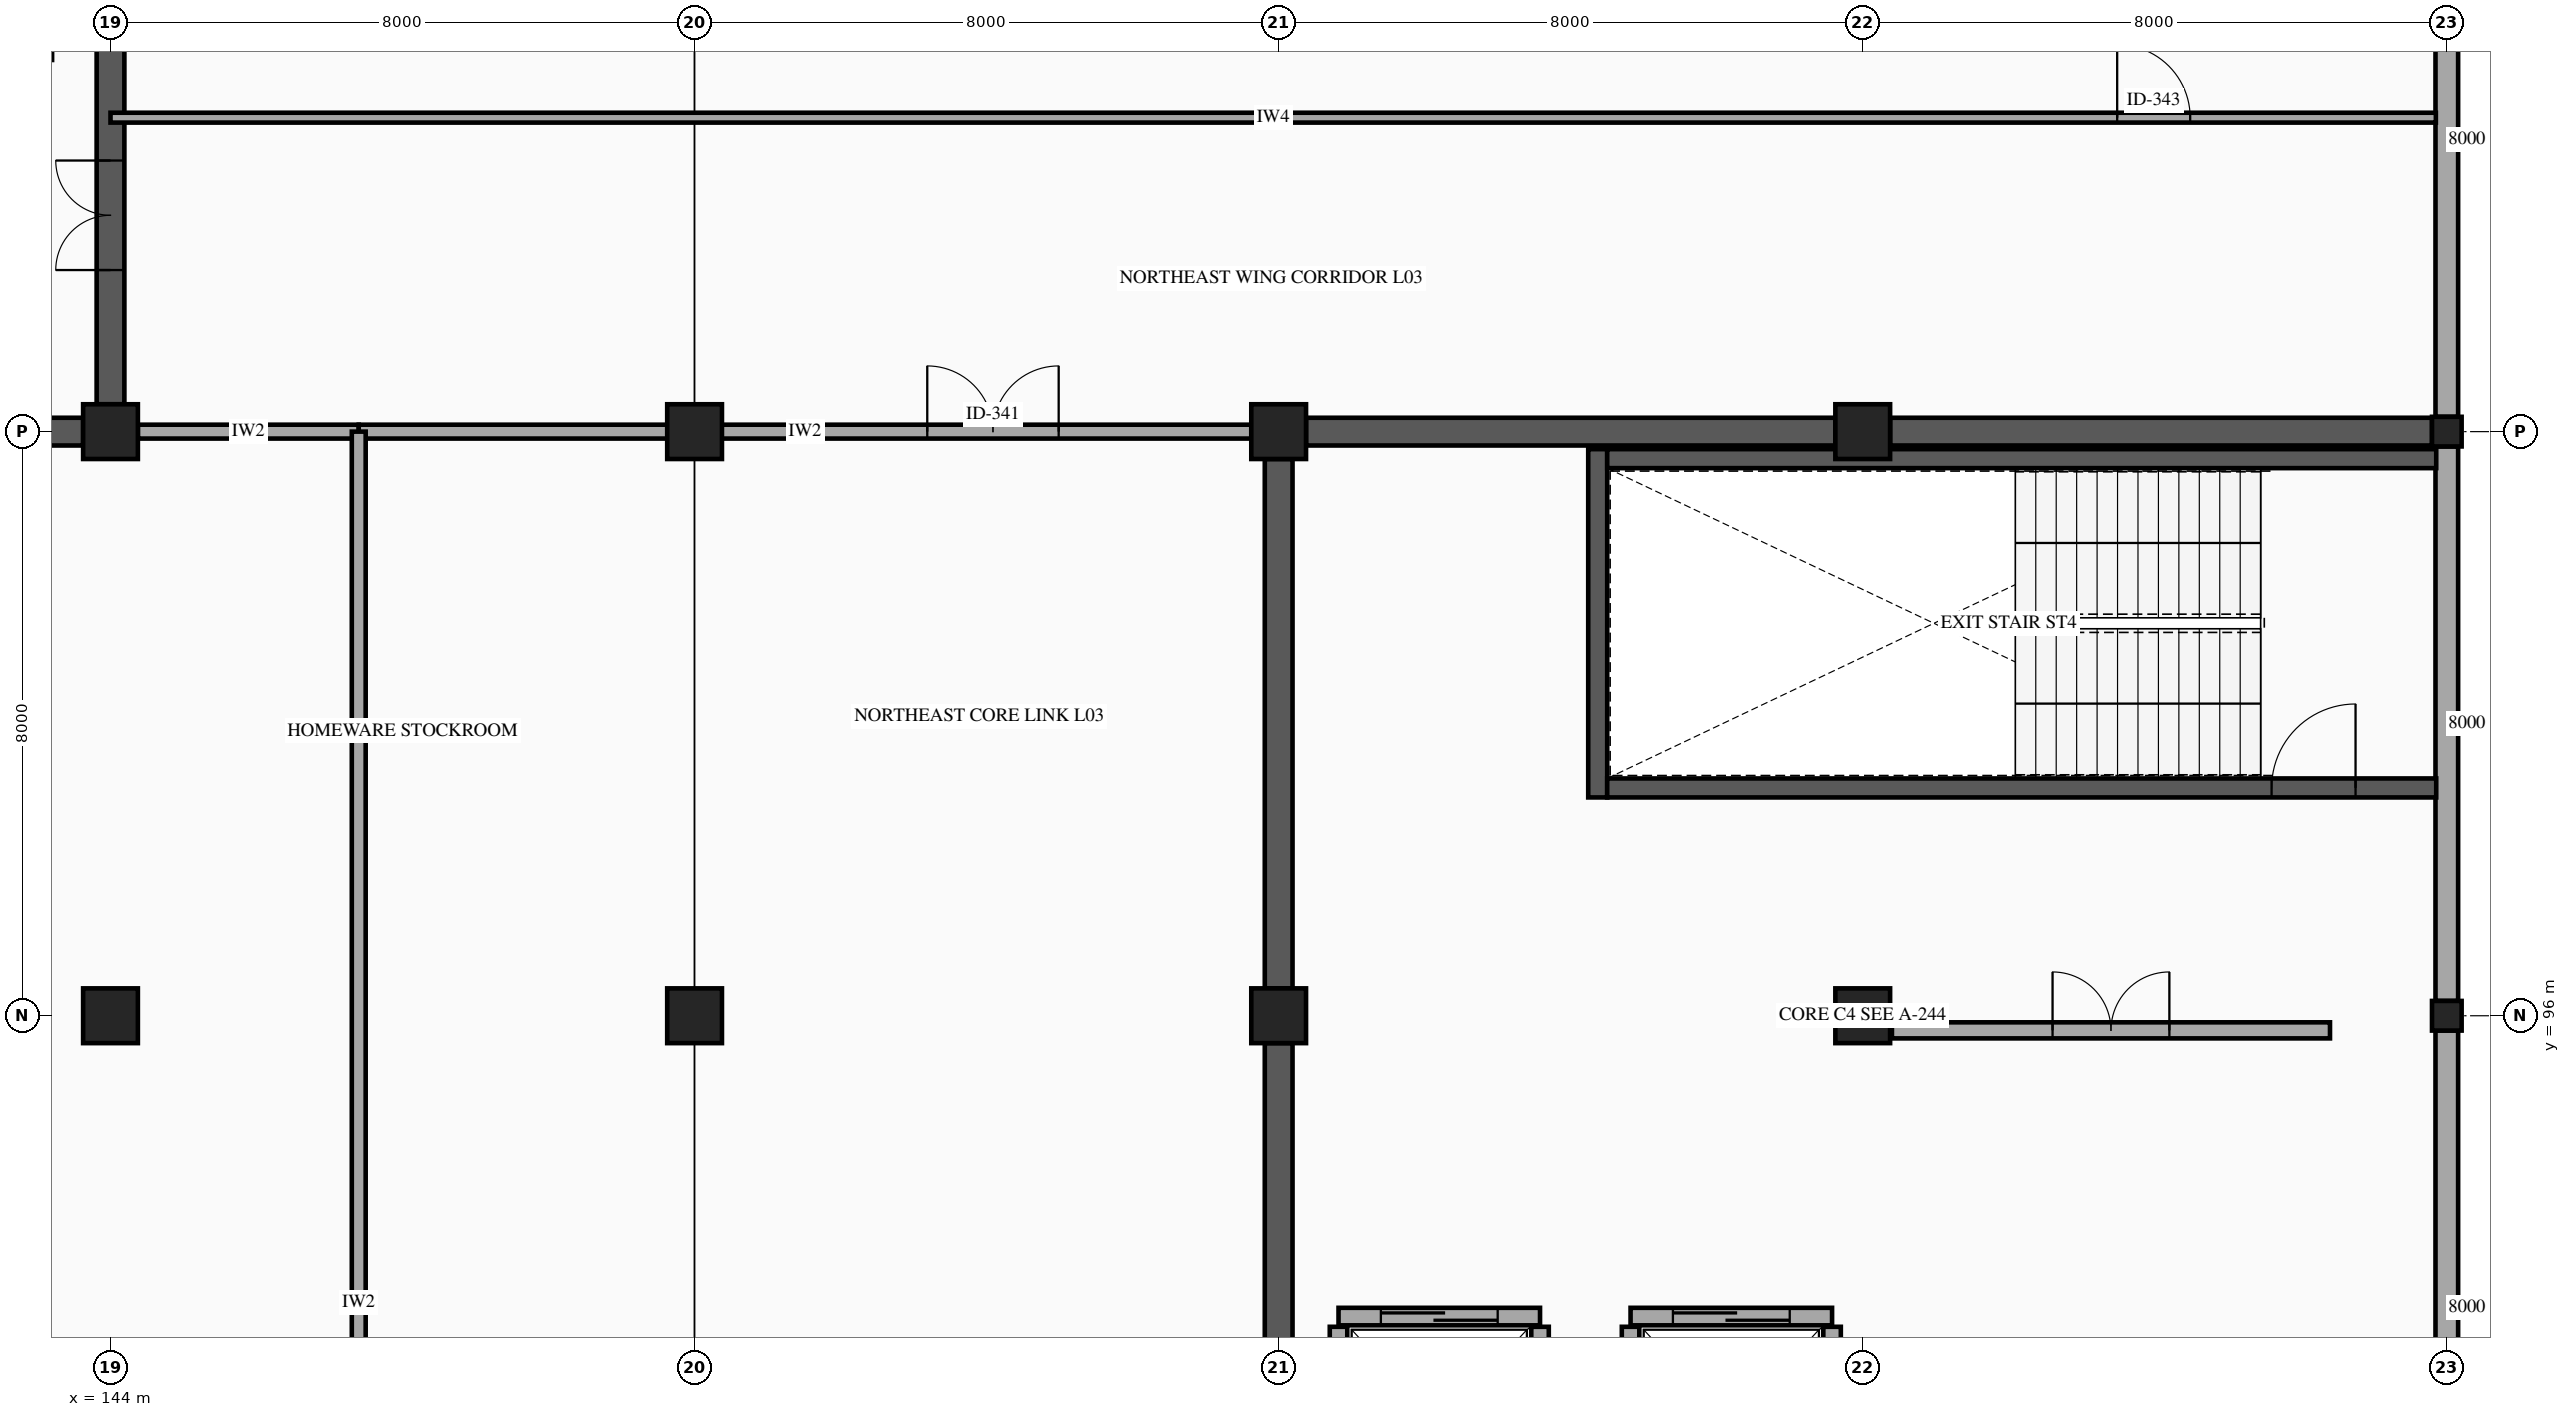
"""IFC4 building model, lengths in metres.
Left out: names, types, materials, properties, quantities, classifications, styles, units other than length and angle.
Written with IfcOpenShell. Run it as: python <this file> out.ifc"""

import sys

from ifc_helpers import new_model, si_unit, direction, frame, frame_2d, origin, origin_2d, place, context, subcontext, project, spatial, rectangle, hollow_rectangle, extrude, element, fill, save


model = new_model("IFC4")
c1 = context("Model", 3, precision=1e-05, world=origin(), true_north=direction((0.0, 1.0)))
c2 = subcontext(c1, "Body", "Model", "MODEL_VIEW")
j1 = project(units=[si_unit("LENGTHUNIT", "METRE"), si_unit("PLANEANGLEUNIT", "RADIAN")], contexts=[c1])
p1 = place(None, origin())
s1 = spatial("IfcSite", under=j1, at=p1, CompositionType="ELEMENT")
p2 = place(p1, origin())
s2 = spatial("IfcBuilding", under=s1, at=p2, CompositionType="ELEMENT")
p3 = place(p2, frame((0.0, 0.0, 14.9)))
s3 = spatial("IfcBuildingStorey", under=s2, at=p3, CompositionType="ELEMENT", Elevation=14.9)
for number, where, z_axis, x_axis in (
    (1, (144.0, 96.0, 0.0), (0.0, 0.0, 1.0), (1.0, 0.0, 0.0)),
    (2, (144.0, 104.0, 0.0), (0.0, 0.0, 1.0), (1.0, 0.0, 0.0)),
    (3, (152.0, 96.0, 0.0), (0.0, 0.0, 1.0), (1.0, 0.0, 0.0)),
    (4, (152.0, 104.0, 0.0), (0.0, 0.0, 1.0), (1.0, 0.0, 0.0)),
    (5, (160.0, 96.0, 0.0), (0.0, 0.0, 1.0), (1.0, 0.0, 0.0)),
    (6, (160.0, 104.0, 0.0), (0.0, 0.0, 1.0), (1.0, 0.0, 0.0)),
    (7, (168.0, 96.0, 0.0), (0.0, 0.0, 1.0), (1.0, 0.0, 0.0)),
    (8, (168.0, 104.0, 0.0), (0.0, 0.0, 1.0), (1.0, 0.0, 0.0)),
):
    element("IfcColumn", number, at=place(p3, frame(where, z_axis=z_axis, x_axis=x_axis)), inside=s3, PredefinedType="COLUMN", context=c2, shape_type="SweptSolid", body=[
        extrude(rectangle(XDim=0.75, YDim=0.75, at=origin_2d()), origin(), (0.0, 0.0, 1.0), 4.5),
    ])
for number, where, z_axis, x_axis in (
    (9, (176.0, 96.0, 0.0), (0.0, 0.0, 1.0), (1.0, 0.0, 0.0)),
    (10, (176.0, 104.0, 0.0), (0.0, 0.0, 1.0), (1.0, 0.0, 0.0)),
):
    element("IfcColumn", number, at=place(p3, frame(where, z_axis=z_axis, x_axis=x_axis)), inside=s3, PredefinedType="COLUMN", context=c2, shape_type="SweptSolid", body=[
        extrude(hollow_rectangle(XDim=0.406, YDim=0.406, WallThickness=0.015, InnerFilletRadius=0.015, OuterFilletRadius=0.029, at=origin_2d()), origin(), (0.0, 0.0, 1.0), 4.5),
    ])
for number, where, z_axis, x_axis in (
    (11, (176.0, 111.797, 0.0), (0.0, 0.0, 1.0), (0.0, -1.0, 0.0)),
    (12, (176.0, 103.797, 0.0), (0.0, 0.0, 1.0), (0.0, -1.0, 0.0)),
    (13, (176.0, 95.797, 0.0), (0.0, 0.0, 1.0), (0.0, -1.0, 0.0)),
):
    element("IfcWall", number, at=place(p3, frame(where, z_axis=z_axis, x_axis=x_axis)), inside=s3, PredefinedType="STANDARD", context=c2, shape_type="SweptSolid", body=[
        extrude(rectangle(XDim=7.594, YDim=0.31, at=frame_2d((3.797, 0.0))), origin(), (0.0, 0.0, 1.0), 3.48),
    ])
p4 = place(p3, frame((136.375, 104.0, 0.0), z_axis=(0.0, 0.0, 1.0), x_axis=(1.0, 0.0, 0.0)))
e14 = element("IfcWall", 14, at=p4, inside=s3, PredefinedType="SHEAR", context=c2, shape_type="SweptSolid", body=[
    extrude(rectangle(XDim=7.25, YDim=0.38, at=frame_2d((3.625, 0.0))), origin(), (0.0, 0.0, 1.0), 4.28),
])
p5 = place(p4, frame((2.875, 0.0, 0.0)))
e15 = element("IfcOpeningElement", 15, at=p5, cuts=e14, PredefinedType="OPENING", context=c2, shape_type="SweptSolid", body=[
    extrude(rectangle(XDim=1.5, YDim=2.15, at=frame_2d((0.75, 1.075))), frame((0.0, 0.2, 0.0), z_axis=(0.0, -1.0, 0.0), x_axis=(1.0, 0.0, 0.0)), (0.0, 0.0, 1.0), 0.4),
])
p6 = place(p3, frame((144.0, 104.375, 0.0), z_axis=(0.0, 0.0, 1.0), x_axis=(0.0, 1.0, 0.0)))
e16 = element("IfcWall", 16, at=p6, inside=s3, PredefinedType="SHEAR", context=c2, shape_type="SweptSolid", body=[
    extrude(rectangle(XDim=7.25, YDim=0.38, at=frame_2d((3.625, 0.0))), origin(), (0.0, 0.0, 1.0), 4.28),
])
p7 = place(p6, frame((1.838, 0.0, 0.0)))
e17 = element("IfcOpeningElement", 17, at=p7, cuts=e16, PredefinedType="OPENING", context=c2, shape_type="SweptSolid", body=[
    extrude(rectangle(XDim=1.5, YDim=2.15, at=frame_2d((0.75, 1.075))), frame((0.0, 0.2, 0.0), z_axis=(0.0, -1.0, 0.0), x_axis=(1.0, 0.0, 0.0)), (0.0, 0.0, 1.0), 0.4),
])
p8 = place(p3, frame((164.37, 98.99, 0.0), z_axis=(0.0, 0.0, 1.0), x_axis=(0.0, 1.0, 0.0)))
e18 = element("IfcWall", 18, at=p8, inside=s3, PredefinedType="SHEAR", context=c2, shape_type="SweptSolid", body=[
    extrude(rectangle(XDim=4.77, YDim=0.26, at=frame_2d((2.385, 0.0))), origin(), (0.0, 0.0, 1.0), 4.28),
])
p9 = place(p3, frame((164.5, 99.12, 0.0), z_axis=(0.0, 0.0, 1.0), x_axis=(1.0, 0.0, 0.0)))
e19 = element("IfcWall", 19, at=p9, inside=s3, PredefinedType="SHEAR", context=c2, shape_type="SweptSolid", body=[
    extrude(rectangle(XDim=11.355, YDim=0.26, at=frame_2d((5.677, 0.0))), origin(), (0.0, 0.0, 1.0), 4.28),
])
p10 = place(p9, frame((9.1, 0.0, 0.0)))
e20 = element("IfcOpeningElement", 20, at=p10, cuts=e19, PredefinedType="OPENING", context=c2, shape_type="SweptSolid", body=[
    extrude(rectangle(XDim=1.15, YDim=2.15, at=frame_2d((0.575, 1.075))), frame((0.0, 0.14, 0.0), z_axis=(0.0, -1.0, 0.0), x_axis=(1.0, 0.0, 0.0)), (0.0, 0.0, 1.0), 0.28),
])
p11 = place(p3, frame((164.5, 103.63, 0.0), z_axis=(0.0, 0.0, 1.0), x_axis=(1.0, 0.0, 0.0)))
e21 = element("IfcWall", 21, at=p11, inside=s3, PredefinedType="SHEAR", context=c2, shape_type="SweptSolid", body=[
    extrude(rectangle(XDim=11.355, YDim=0.26, at=frame_2d((5.677, 0.0))), origin(), (0.0, 0.0, 1.0), 4.28),
])
p12 = place(p3, frame((160.375, 104.0, 0.0), z_axis=(0.0, 0.0, 1.0), x_axis=(1.0, 0.0, 0.0)))
e22 = element("IfcWall", 22, at=p12, inside=s3, PredefinedType="SHEAR", context=c2, shape_type="SweptSolid", body=[
    extrude(rectangle(XDim=7.25, YDim=0.38, at=frame_2d((3.625, 0.0))), origin(), (0.0, 0.0, 1.0), 4.28),
])
p13 = place(p3, frame((168.375, 104.0, 0.0), z_axis=(0.0, 0.0, 1.0), x_axis=(1.0, 0.0, 0.0)))
e23 = element("IfcWall", 23, at=p13, inside=s3, PredefinedType="SHEAR", context=c2, shape_type="SweptSolid", body=[
    extrude(rectangle(XDim=7.422, YDim=0.38, at=frame_2d((3.711, 0.0))), origin(), (0.0, 0.0, 1.0), 4.28),
])
for number, where, z_axis, x_axis in (
    (24, (160.0, 88.375, 0.0), (0.0, 0.0, 1.0), (0.0, 1.0, 0.0)),
    (25, (160.0, 96.375, 0.0), (0.0, 0.0, 1.0), (0.0, 1.0, 0.0)),
):
    element("IfcWall", number, at=place(p3, frame(where, z_axis=z_axis, x_axis=x_axis)), inside=s3, PredefinedType="SHEAR", context=c2, shape_type="SweptSolid", body=[
        extrude(rectangle(XDim=7.25, YDim=0.38, at=frame_2d((3.625, 0.0))), origin(), (0.0, 0.0, 1.0), 4.28),
    ])
p14 = place(p3, frame((164.82, 91.88, 0.0), z_axis=(0.0, 0.0, 1.0), x_axis=(1.0, 0.0, 0.0)))
e26 = element("IfcWall", 26, at=p14, inside=s3, PredefinedType="PARTITIONING", context=c2, shape_type="SweptSolid", body=[
    extrude(rectangle(XDim=2.76, YDim=0.24, at=frame_2d((1.38, 0.0))), origin(), (0.0, 0.0, 1.0), 4.28),
])
p15 = place(p14, frame((0.58, 0.0, 0.0)))
e27 = element("IfcOpeningElement", 27, at=p15, cuts=e26, PredefinedType="OPENING", context=c2, shape_type="SweptSolid", body=[
    extrude(rectangle(XDim=1.6, YDim=2.3, at=frame_2d((0.8, 1.15))), frame((0.0, 0.13, 0.0), z_axis=(0.0, -1.0, 0.0), x_axis=(1.0, 0.0, 0.0)), (0.0, 0.0, 1.0), 0.26),
])
for number, where, z_axis, x_axis in (
    (28, (164.82, 89.06, 0.0), (0.0, 0.0, 1.0), (0.0, 1.0, 0.0)),
    (29, (167.58, 89.06, 0.0), (0.0, 0.0, 1.0), (0.0, 1.0, 0.0)),
):
    element("IfcWall", number, at=place(p3, frame(where, z_axis=z_axis, x_axis=x_axis)), inside=s3, PredefinedType="PARTITIONING", context=c2, shape_type="SweptSolid", body=[
        extrude(rectangle(XDim=2.68, YDim=0.24, at=frame_2d((1.34, 0.0))), origin(), (0.0, 0.0, 1.0), 4.28),
    ])
p16 = place(p3, frame((160.82, 91.88, 0.0), z_axis=(0.0, 0.0, 1.0), x_axis=(1.0, 0.0, 0.0)))
e30 = element("IfcWall", 30, at=p16, inside=s3, PredefinedType="PARTITIONING", context=c2, shape_type="SweptSolid", body=[
    extrude(rectangle(XDim=2.76, YDim=0.24, at=frame_2d((1.38, 0.0))), origin(), (0.0, 0.0, 1.0), 4.28),
])
p17 = place(p16, frame((0.58, 0.0, 0.0)))
e31 = element("IfcOpeningElement", 31, at=p17, cuts=e30, PredefinedType="OPENING", context=c2, shape_type="SweptSolid", body=[
    extrude(rectangle(XDim=1.6, YDim=2.3, at=frame_2d((0.8, 1.15))), frame((0.0, 0.13, 0.0), z_axis=(0.0, -1.0, 0.0), x_axis=(1.0, 0.0, 0.0)), (0.0, 0.0, 1.0), 0.26),
])
for number, where, z_axis, x_axis in (
    (32, (160.82, 89.06, 0.0), (0.0, 0.0, 1.0), (0.0, 1.0, 0.0)),
    (33, (163.58, 89.06, 0.0), (0.0, 0.0, 1.0), (0.0, 1.0, 0.0)),
):
    element("IfcWall", number, at=place(p3, frame(where, z_axis=z_axis, x_axis=x_axis)), inside=s3, PredefinedType="PARTITIONING", context=c2, shape_type="SweptSolid", body=[
        extrude(rectangle(XDim=2.68, YDim=0.24, at=frame_2d((1.34, 0.0))), origin(), (0.0, 0.0, 1.0), 4.28),
    ])
p18 = place(p3, frame((168.4, 95.8, 0.0), z_axis=(0.0, 0.0, 1.0), x_axis=(1.0, 0.0, 0.0)))
e34 = element("IfcWall", 34, at=p18, inside=s3, PredefinedType="PARTITIONING", context=c2, shape_type="SweptSolid", body=[
    extrude(rectangle(XDim=6.0, YDim=0.22, at=frame_2d((3.0, 0.0))), origin(), (0.0, 0.0, 1.0), 3.48),
])
p19 = place(p18, frame((2.2, 0.0, 0.0)))
e35 = element("IfcOpeningElement", 35, at=p19, cuts=e34, PredefinedType="OPENING", context=c2, shape_type="SweptSolid", body=[
    extrude(rectangle(XDim=1.6, YDim=2.15, at=frame_2d((0.8, 1.075))), frame((0.0, 0.12, 0.0), z_axis=(0.0, -1.0, 0.0), x_axis=(1.0, 0.0, 0.0)), (0.0, 0.0, 1.0), 0.24),
])
p20 = place(p3, frame((144.375, 104.0, 0.0), z_axis=(0.0, 0.0, 1.0), x_axis=(1.0, 0.0, 0.0)))
e36 = element("IfcWall", 36, at=p20, inside=s3, PredefinedType="PARTITIONING", context=c2, shape_type="SweptSolid", body=[
    extrude(rectangle(XDim=3.025, YDim=0.19, at=frame_2d((1.512, 0.0))), origin(), (0.0, 0.0, 1.0), 3.48),
])
p21 = place(p3, frame((147.4, 104.0, 0.0), z_axis=(0.0, 0.0, 1.0), x_axis=(1.0, 0.0, 0.0)))
e37 = element("IfcWall", 37, at=p21, inside=s3, PredefinedType="PARTITIONING", context=c2, shape_type="SweptSolid", body=[
    extrude(rectangle(XDim=12.225, YDim=0.19, at=frame_2d((6.113, 0.0))), origin(), (0.0, 0.0, 1.0), 3.48),
])
p22 = place(p21, frame((7.787, 0.0, 0.0)))
e38 = element("IfcOpeningElement", 38, at=p22, cuts=e37, PredefinedType="OPENING", context=c2, shape_type="SweptSolid", body=[
    extrude(rectangle(XDim=1.8, YDim=2.25, at=frame_2d((0.9, 1.125))), frame((0.0, 0.105, 0.0), z_axis=(0.0, -1.0, 0.0), x_axis=(1.0, 0.0, 0.0)), (0.0, 0.0, 1.0), 0.21),
])
p23 = place(p3, frame((147.4, 80.15, 0.0), z_axis=(0.0, 0.0, 1.0), x_axis=(0.0, 1.0, 0.0)))
e39 = element("IfcWall", 39, at=p23, inside=s3, PredefinedType="PARTITIONING", context=c2, shape_type="SweptSolid", body=[
    extrude(rectangle(XDim=23.85, YDim=0.19, at=frame_2d((11.925, 0.0))), origin(), (0.0, 0.0, 1.0), 3.48),
])
p24 = place(p23, frame((2.862, 0.0, 0.0)))
e40 = element("IfcOpeningElement", 40, at=p24, cuts=e39, PredefinedType="OPENING", context=c2, shape_type="SweptSolid", body=[
    extrude(rectangle(XDim=1.8, YDim=2.25, at=frame_2d((0.9, 1.125))), frame((0.0, 0.105, 0.0), z_axis=(0.0, -1.0, 0.0), x_axis=(1.0, 0.0, 0.0)), (0.0, 0.0, 1.0), 0.21),
])
p25 = place(p3, frame((144.0, 108.3, 0.0), z_axis=(0.0, 0.0, 1.0), x_axis=(1.0, 0.0, 0.0)))
e41 = element("IfcWall", 41, at=p25, inside=s3, PredefinedType="PARTITIONING", context=c2, shape_type="SweptSolid", body=[
    extrude(rectangle(XDim=31.85, YDim=0.135, at=frame_2d((15.925, 0.0))), origin(), (0.0, 0.0, 1.0), 3.48),
])
p26 = place(p25, frame((27.485, 0.0, 0.0)))
e42 = element("IfcOpeningElement", 42, at=p26, cuts=e41, PredefinedType="OPENING", context=c2, shape_type="SweptSolid", body=[
    extrude(rectangle(XDim=1.0, YDim=2.15, at=frame_2d((0.5, 1.075))), frame((0.0, 0.077, 0.0), z_axis=(0.0, -1.0, 0.0), x_axis=(1.0, 0.0, 0.0)), (0.0, 0.0, 1.0), 0.155),
])
p27 = place(p7, origin())
e43 = element("IfcDoor", 43, at=p27, inside=s3, OperationType="DOUBLE_DOOR_SINGLE_SWING", PredefinedType="DOOR", context=c2, shape_type="SweptSolid", body=[
    extrude(rectangle(XDim=1.5, YDim=2.15, at=frame_2d((0.75, 1.075))), frame((0.0, 0.025, 0.0), z_axis=(0.0, -1.0, 0.0), x_axis=(1.0, 0.0, 0.0)), (0.0, 0.0, 1.0), 0.05),
])
fill(e17, e43)
p28 = place(p10, origin())
e44 = element("IfcDoor", 44, at=p28, inside=s3, OperationType="SINGLE_SWING_RIGHT", PredefinedType="DOOR", context=c2, shape_type="SweptSolid", body=[
    extrude(rectangle(XDim=1.15, YDim=2.15, at=frame_2d((0.575, 1.075))), frame((0.0, 0.025, 0.0), z_axis=(0.0, -1.0, 0.0), x_axis=(1.0, 0.0, 0.0)), (0.0, 0.0, 1.0), 0.05),
])
fill(e20, e44)
p29 = place(p15, origin())
e45 = element("IfcDoor", 45, at=p29, inside=s3, OperationType="SLIDING_TO_LEFT", PredefinedType="DOOR", context=c2, shape_type="SweptSolid", body=[
    extrude(rectangle(XDim=1.6, YDim=2.3, at=frame_2d((0.8, 1.15))), frame((0.0, 0.025, 0.0), z_axis=(0.0, -1.0, 0.0), x_axis=(1.0, 0.0, 0.0)), (0.0, 0.0, 1.0), 0.05),
])
fill(e27, e45)
p30 = place(p17, origin())
e46 = element("IfcDoor", 46, at=p30, inside=s3, OperationType="SLIDING_TO_LEFT", PredefinedType="DOOR", context=c2, shape_type="SweptSolid", body=[
    extrude(rectangle(XDim=1.6, YDim=2.3, at=frame_2d((0.8, 1.15))), frame((0.0, 0.025, 0.0), z_axis=(0.0, -1.0, 0.0), x_axis=(1.0, 0.0, 0.0)), (0.0, 0.0, 1.0), 0.05),
])
fill(e31, e46)
p31 = place(p19, origin())
e47 = element("IfcDoor", 47, at=p31, inside=s3, OperationType="DOUBLE_DOOR_SINGLE_SWING", PredefinedType="DOOR", context=c2, shape_type="SweptSolid", body=[
    extrude(rectangle(XDim=1.6, YDim=2.15, at=frame_2d((0.8, 1.075))), frame((0.0, 0.025, 0.0), z_axis=(0.0, -1.0, 0.0), x_axis=(1.0, 0.0, 0.0)), (0.0, 0.0, 1.0), 0.05),
])
fill(e35, e47)
p32 = place(p22, origin())
e48 = element("IfcDoor", 48, at=p32, inside=s3, OperationType="DOUBLE_DOOR_SINGLE_SWING", PredefinedType="DOOR", context=c2, shape_type="SweptSolid", body=[
    extrude(rectangle(XDim=1.8, YDim=2.25, at=frame_2d((0.9, 1.125))), frame((0.0, 0.025, 0.0), z_axis=(0.0, -1.0, 0.0), x_axis=(1.0, 0.0, 0.0)), (0.0, 0.0, 1.0), 0.05),
])
fill(e38, e48)
p33 = place(p26, origin())
e49 = element("IfcDoor", 49, at=p33, inside=s3, OperationType="SINGLE_SWING_LEFT", PredefinedType="DOOR", context=c2, shape_type="SweptSolid", body=[
    extrude(rectangle(XDim=1.0, YDim=2.15, at=frame_2d((0.5, 1.075))), frame((0.0, 0.025, 0.0), z_axis=(0.0, -1.0, 0.0), x_axis=(1.0, 0.0, 0.0)), (0.0, 0.0, 1.0), 0.05),
])
fill(e42, e49)
save(model, sys.argv[1])
